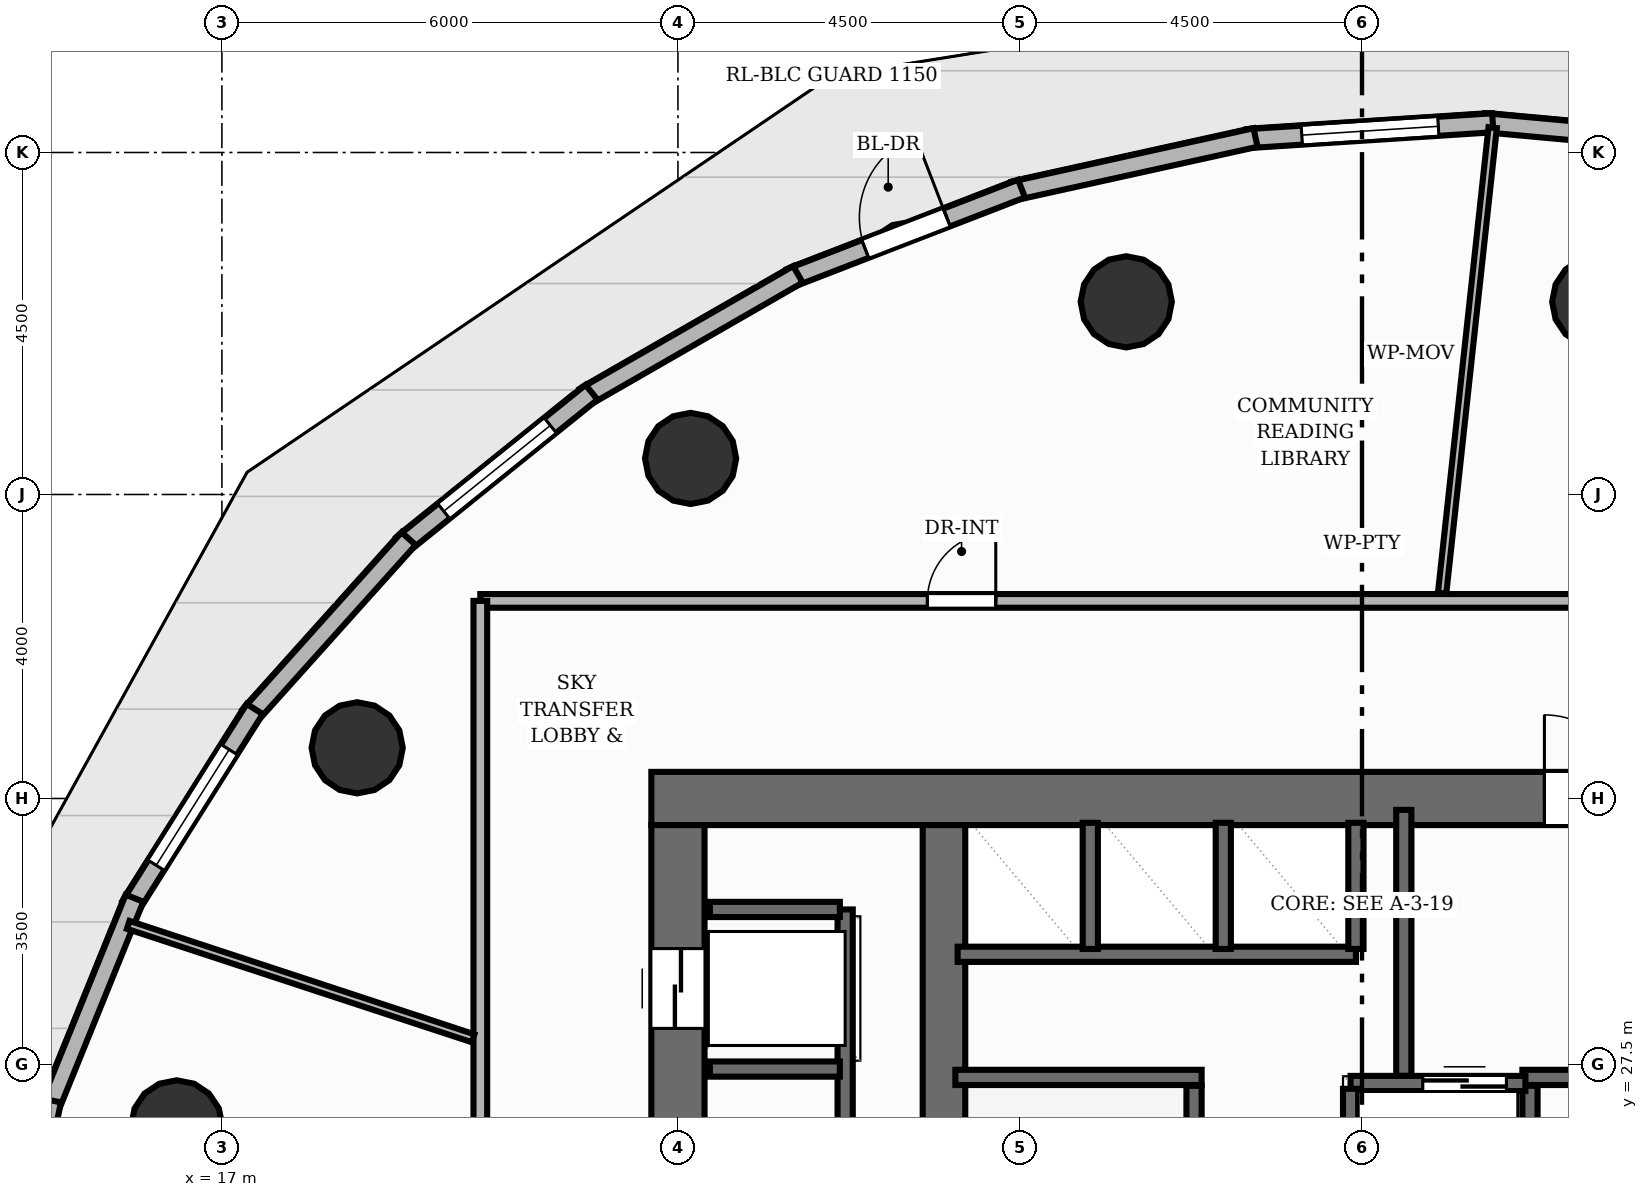
"""IFC4 building model, lengths in metres.
Left out: names, types, materials, properties, quantities, classifications, styles, units other than length and angle.
Written with IfcOpenShell. Run it as: python <this file> out.ifc"""

import sys

from ifc_helpers import new_model, si_unit, direction, frame, frame_2d, origin, origin_2d, place, context, subcontext, project, spatial, rectangle, circle, extrude, element, fill, save


model = new_model("IFC4")
c1 = context("Model", 3, precision=1e-05, world=origin(), true_north=direction((0.0, 1.0)))
c2 = subcontext(c1, "Body", "Model", "MODEL_VIEW")
j1 = project(units=[si_unit("LENGTHUNIT", "METRE"), si_unit("PLANEANGLEUNIT", "RADIAN")], contexts=[c1])
p1 = place(None, origin())
s1 = spatial("IfcSite", under=j1, at=p1, CompositionType="ELEMENT")
p2 = place(p1, origin())
s2 = spatial("IfcBuilding", under=s1, at=p2, CompositionType="ELEMENT")
p3 = place(p2, frame((0.0, 0.0, 70.88)))
s3 = spatial("IfcBuildingStorey", under=s2, at=p3, CompositionType="ELEMENT", Elevation=70.88)
p4 = place(p3, frame((22.65, 31.0, 0.0), z_axis=(0.0, 0.0, 1.0), x_axis=(1.0, 0.0, 0.0)))
e1 = element("IfcWall", 1, at=p4, inside=s3, PredefinedType="SHEAR", context=c2, shape_type="SweptSolid", body=[
    extrude(rectangle(XDim=18.7, YDim=0.7, at=frame_2d((9.35, 0.0))), origin(), (0.0, 0.0, 1.0), 3.2),
])
p5 = place(p4, frame((11.75, 0.0, 0.0)))
e2 = element("IfcOpeningElement", 2, at=p5, cuts=e1, PredefinedType="OPENING", context=c2, shape_type="SweptSolid", body=[
    extrude(rectangle(XDim=1.1, YDim=2.15, at=frame_2d((0.55, 1.075))), frame((0.0, 0.36, 0.0), z_axis=(0.0, -1.0, 0.0), x_axis=(1.0, 0.0, 0.0)), (0.0, 0.0, 1.0), 0.72),
])
p6 = place(p3, frame((23.0, 17.35, 0.0), z_axis=(0.0, 0.0, 1.0), x_axis=(0.0, 1.0, 0.0)))
e3 = element("IfcWall", 3, at=p6, inside=s3, PredefinedType="SHEAR", context=c2, shape_type="SweptSolid", body=[
    extrude(rectangle(XDim=13.3, YDim=0.7, at=frame_2d((6.65, 0.0))), origin(), (0.0, 0.0, 1.0), 3.2),
])
p7 = place(p6, frame((1.625, 0.0, 0.0)))
e4 = element("IfcOpeningElement", 4, at=p7, cuts=e3, PredefinedType="OPENING", context=c2, shape_type="SweptSolid", body=[
    extrude(rectangle(XDim=1.05, YDim=2.15, at=frame_2d((0.525, 1.075))), frame((0.0, 0.36, 0.0), z_axis=(0.0, -1.0, 0.0), x_axis=(1.0, 0.0, 0.0)), (0.0, 0.0, 1.0), 0.72),
])
p8 = place(p6, frame((6.125, 0.0, 0.0)))
e5 = element("IfcOpeningElement", 5, at=p8, cuts=e3, PredefinedType="OPENING", context=c2, shape_type="SweptSolid", body=[
    extrude(rectangle(XDim=1.05, YDim=2.15, at=frame_2d((0.525, 1.075))), frame((0.0, 0.36, 0.0), z_axis=(0.0, -1.0, 0.0), x_axis=(1.0, 0.0, 0.0)), (0.0, 0.0, 1.0), 0.72),
])
p9 = place(p6, frame((10.625, 0.0, 0.0)))
e6 = element("IfcOpeningElement", 6, at=p9, cuts=e3, PredefinedType="OPENING", context=c2, shape_type="SweptSolid", body=[
    extrude(rectangle(XDim=1.05, YDim=2.15, at=frame_2d((0.525, 1.075))), frame((0.0, 0.36, 0.0), z_axis=(0.0, -1.0, 0.0), x_axis=(1.0, 0.0, 0.0)), (0.0, 0.0, 1.0), 0.72),
])
p10 = place(p3, frame((26.5, 17.35, 0.0), z_axis=(0.0, 0.0, 1.0), x_axis=(0.0, 1.0, 0.0)))
e7 = element("IfcWall", 7, at=p10, inside=s3, PredefinedType="SHEAR", context=c2, shape_type="SweptSolid", body=[
    extrude(rectangle(XDim=13.3, YDim=0.56, at=frame_2d((6.65, 0.0))), origin(), (0.0, 0.0, 1.0), 3.2),
])
for number, where, z_axis, x_axis in (
    (8, (35.102, 37.535, 0.0), (0.0, 0.0, 1.0), (1.0, 0.0, 0.0)),
    (9, (28.898, 37.535, 0.0), (0.0, 0.0, 1.0), (1.0, 0.0, 0.0)),
    (10, (23.167, 35.474, 0.0), (0.0, 0.0, 1.0), (1.0, 0.0, 0.0)),
    (11, (18.78, 31.667, 0.0), (0.0, 0.0, 1.0), (1.0, 0.0, 0.0)),
    (12, (16.406, 26.692, 0.0), (0.0, 0.0, 1.0), (1.0, 0.0, 0.0)),
):
    element("IfcColumn", number, at=place(p3, frame(where, z_axis=z_axis, x_axis=x_axis)), inside=s3, PredefinedType="COLUMN", context=c2, shape_type="SweptSolid", body=[
        extrude(circle(Radius=0.6, at=origin_2d()), origin(), (0.0, 0.0, 1.0), 3.2),
    ])
p11 = place(p3, frame((33.612, 39.892, 0.0), z_axis=(0.0, 0.0, 1.0), x_axis=(0.9958277433, -0.091252976247, 0.0)))
e13 = element("IfcWall", 13, at=p11, inside=s3, PredefinedType="SOLIDWALL", context=c2, shape_type="SweptSolid", body=[
    extrude(rectangle(XDim=3.192, YDim=0.25, at=frame_2d((1.596, 0.0))), origin(), (0.0, 0.0, 1.0), 2.96),
])
p12 = place(p3, frame((30.491, 39.682, 0.0), z_axis=(0.0, 0.0, 1.0), x_axis=(0.997907602465, 0.064656143896, 0.0)))
e14 = element("IfcWall", 14, at=p12, inside=s3, PredefinedType="SOLIDWALL", context=c2, shape_type="SweptSolid", body=[
    extrude(rectangle(XDim=3.236, YDim=0.25, at=frame_2d((1.618, 0.0))), origin(), (0.0, 0.0, 1.0), 2.96),
])
p13 = place(p12, frame((0.718, 0.0, 0.85)))
e15 = element("IfcOpeningElement", 15, at=p13, cuts=e14, PredefinedType="OPENING", context=c2, shape_type="SweptSolid", body=[
    extrude(rectangle(XDim=1.8, YDim=2.0, at=frame_2d((0.9, 1.0))), frame((0.0, 0.135, 0.0), z_axis=(0.0, -1.0, 0.0), x_axis=(1.0, 0.0, 0.0)), (0.0, 0.0, 1.0), 0.27),
])
p14 = place(p3, frame((27.416, 38.994, 0.0), z_axis=(0.0, 0.0, 1.0), x_axis=(0.976457694784, 0.215708994476, 0.0)))
e16 = element("IfcWall", 16, at=p14, inside=s3, PredefinedType="SOLIDWALL", context=c2, shape_type="SweptSolid", body=[
    extrude(rectangle(XDim=3.26, YDim=0.25, at=frame_2d((1.63, 0.0))), origin(), (0.0, 0.0, 1.0), 2.96),
])
p15 = place(p3, frame((24.48, 37.85, 0.0), z_axis=(0.0, 0.0, 1.0), x_axis=(0.932707116004, 0.360634767812, 0.0)))
e17 = element("IfcWall", 17, at=p15, inside=s3, PredefinedType="SOLIDWALL", context=c2, shape_type="SweptSolid", body=[
    extrude(rectangle(XDim=3.26, YDim=0.25, at=frame_2d((1.63, 0.0))), origin(), (0.0, 0.0, 1.0), 2.96),
])
p16 = place(p15, frame((1.055, 0.0, 0.0)))
e18 = element("IfcOpeningElement", 18, at=p16, cuts=e17, PredefinedType="OPENING", context=c2, shape_type="SweptSolid", body=[
    extrude(rectangle(XDim=1.15, YDim=2.2, at=frame_2d((0.575, 1.1))), frame((0.0, 0.135, 0.0), z_axis=(0.0, -1.0, 0.0), x_axis=(1.0, 0.0, 0.0)), (0.0, 0.0, 1.0), 0.27),
])
p17 = place(p3, frame((21.773, 36.283, 0.0), z_axis=(0.0, 0.0, 1.0), x_axis=(0.866935640597, 0.498420098975, 0.0)))
e19 = element("IfcWall", 19, at=p17, inside=s3, PredefinedType="SOLIDWALL", context=c2, shape_type="SweptSolid", body=[
    extrude(rectangle(XDim=3.236, YDim=0.25, at=frame_2d((1.618, 0.0))), origin(), (0.0, 0.0, 1.0), 2.96),
])
p18 = place(p3, frame((19.377, 34.344, 0.0), z_axis=(0.0, 0.0, 1.0), x_axis=(0.778932404301, 0.627107893054, 0.0)))
e20 = element("IfcWall", 20, at=p18, inside=s3, PredefinedType="SOLIDWALL", context=c2, shape_type="SweptSolid", body=[
    extrude(rectangle(XDim=3.192, YDim=0.25, at=frame_2d((1.596, 0.0))), origin(), (0.0, 0.0, 1.0), 2.96),
])
p19 = place(p18, frame((0.696, 0.0, 0.85)))
e21 = element("IfcOpeningElement", 21, at=p19, cuts=e20, PredefinedType="OPENING", context=c2, shape_type="SweptSolid", body=[
    extrude(rectangle(XDim=1.8, YDim=2.0, at=frame_2d((0.9, 1.0))), frame((0.0, 0.135, 0.0), z_axis=(0.0, -1.0, 0.0), x_axis=(1.0, 0.0, 0.0)), (0.0, 0.0, 1.0), 0.27),
])
p20 = place(p3, frame((17.365, 32.089, 0.0), z_axis=(0.0, 0.0, 1.0), x_axis=(0.66790863438, 0.744243277511, 0.0)))
e22 = element("IfcWall", 22, at=p20, inside=s3, PredefinedType="SOLIDWALL", context=c2, shape_type="SweptSolid", body=[
    extrude(rectangle(XDim=3.131, YDim=0.25, at=frame_2d((1.565, 0.0))), origin(), (0.0, 0.0, 1.0), 2.96),
])
p21 = place(p3, frame((15.799, 29.588, 0.0), z_axis=(0.0, 0.0, 1.0), x_axis=(0.533407635949, 0.845858317871, 0.0)))
e23 = element("IfcWall", 23, at=p21, inside=s3, PredefinedType="SOLIDWALL", context=c2, shape_type="SweptSolid", body=[
    extrude(rectangle(XDim=3.061, YDim=0.25, at=frame_2d((1.53, 0.0))), origin(), (0.0, 0.0, 1.0), 2.96),
])
p22 = place(p21, frame((0.63, 0.0, 0.85)))
e24 = element("IfcOpeningElement", 24, at=p22, cuts=e23, PredefinedType="OPENING", context=c2, shape_type="SweptSolid", body=[
    extrude(rectangle(XDim=1.8, YDim=2.0, at=frame_2d((0.9, 1.0))), frame((0.0, 0.135, 0.0), z_axis=(0.0, -1.0, 0.0), x_axis=(1.0, 0.0, 0.0)), (0.0, 0.0, 1.0), 0.27),
])
p23 = place(p3, frame((14.727, 26.918, 0.0), z_axis=(0.0, 0.0, 1.0), x_axis=(0.376048320415, 0.926600054345, 0.0)))
e25 = element("IfcWall", 25, at=p23, inside=s3, PredefinedType="SOLIDWALL", context=c2, shape_type="SweptSolid", body=[
    extrude(rectangle(XDim=2.988, YDim=0.25, at=frame_2d((1.494, 0.0))), origin(), (0.0, 0.0, 1.0), 2.96),
])
p24 = place(p3, frame((14.179, 24.161, 0.0), z_axis=(0.0, 0.0, 1.0), x_axis=(0.198331811595, 0.980134935868, 0.0)))
e26 = element("IfcWall", 26, at=p24, inside=s3, PredefinedType="SOLIDWALL", context=c2, shape_type="SweptSolid", body=[
    extrude(rectangle(XDim=2.924, YDim=0.25, at=frame_2d((1.462, 0.0))), origin(), (0.0, 0.0, 1.0), 2.96),
])
p25 = place(p24, frame((0.562, 0.0, 0.85)))
e27 = element("IfcOpeningElement", 27, at=p25, cuts=e26, PredefinedType="OPENING", context=c2, shape_type="SweptSolid", body=[
    extrude(rectangle(XDim=1.8, YDim=2.0, at=frame_2d((0.9, 1.0))), frame((0.0, 0.135, 0.0), z_axis=(0.0, -1.0, 0.0), x_axis=(1.0, 0.0, 0.0)), (0.0, 0.0, 1.0), 0.27),
])
p26 = place(p3, frame((29.79, 20.78, 0.0), z_axis=(0.0, 0.0, 1.0), x_axis=(0.0, 1.0, 0.0)))
e28 = element("IfcWall", 28, at=p26, inside=s3, PredefinedType="SHEAR", context=c2, shape_type="SweptSolid", body=[
    extrude(rectangle(XDim=6.44, YDim=0.2, at=frame_2d((3.22, 0.0))), origin(), (0.0, 0.0, 1.0), 3.2),
])
p27 = place(p3, frame((26.65, 27.33, 0.0), z_axis=(0.0, 0.0, 1.0), x_axis=(1.0, 0.0, 0.0)))
e29 = element("IfcWall", 29, at=p27, inside=s3, PredefinedType="SHEAR", context=c2, shape_type="SweptSolid", body=[
    extrude(rectangle(XDim=3.24, YDim=0.2, at=frame_2d((1.62, 0.0))), origin(), (0.0, 0.0, 1.0), 3.2),
])
p28 = place(p3, frame((34.21, 20.78, 0.0), z_axis=(0.0, 0.0, 1.0), x_axis=(0.0, 1.0, 0.0)))
e30 = element("IfcWall", 30, at=p28, inside=s3, PredefinedType="SHEAR", context=c2, shape_type="SweptSolid", body=[
    extrude(rectangle(XDim=6.44, YDim=0.2, at=frame_2d((3.22, 0.0))), origin(), (0.0, 0.0, 1.0), 3.2),
])
p29 = place(p3, frame((34.11, 27.33, 0.0), z_axis=(0.0, 0.0, 1.0), x_axis=(1.0, 0.0, 0.0)))
e31 = element("IfcWall", 31, at=p29, inside=s3, PredefinedType="SHEAR", context=c2, shape_type="SweptSolid", body=[
    extrude(rectangle(XDim=3.24, YDim=0.2, at=frame_2d((1.62, 0.0))), origin(), (0.0, 0.0, 1.0), 3.2),
])
p30 = place(p29, frame((1.135, 0.0, 0.0)))
e32 = element("IfcOpeningElement", 32, at=p30, cuts=e31, PredefinedType="OPENING", context=c2, shape_type="SweptSolid", body=[
    extrude(rectangle(XDim=1.05, YDim=2.15, at=frame_2d((0.525, 1.075))), frame((0.0, 0.11, 0.0), z_axis=(0.0, -1.0, 0.0), x_axis=(1.0, 0.0, 0.0)), (0.0, 0.0, 1.0), 0.22),
])
p31 = place(p3, frame((32.55, 27.35, 0.0), z_axis=(0.0, 0.0, 1.0), x_axis=(0.0, 1.0, 0.0)))
e33 = element("IfcWall", 33, at=p31, inside=s3, PredefinedType="SHEAR", context=c2, shape_type="SweptSolid", body=[
    extrude(rectangle(XDim=3.5, YDim=0.2, at=frame_2d((1.75, 0.0))), origin(), (0.0, 0.0, 1.0), 3.2),
])
p32 = place(p3, frame((31.85, 27.25, 0.0), z_axis=(0.0, 0.0, 1.0), x_axis=(1.0, 0.0, 0.0)))
e34 = element("IfcWall", 34, at=p32, inside=s3, PredefinedType="SHEAR", context=c2, shape_type="SweptSolid", body=[
    extrude(rectangle(XDim=2.3, YDim=0.2, at=frame_2d((1.15, 0.0))), origin(), (0.0, 0.0, 1.0), 3.2),
])
p33 = place(p32, frame((0.95, 0.0, 0.0)))
e35 = element("IfcOpeningElement", 35, at=p33, cuts=e34, PredefinedType="OPENING", context=c2, shape_type="SweptSolid", body=[
    extrude(rectangle(XDim=1.1, YDim=2.15, at=frame_2d((0.55, 1.075))), frame((0.0, 0.11, 0.0), z_axis=(0.0, -1.0, 0.0), x_axis=(1.0, 0.0, 0.0)), (0.0, 0.0, 1.0), 0.22),
])
p34 = place(p3, frame((31.85, 25.47, 0.0), z_axis=(0.0, 0.0, 1.0), x_axis=(0.0, 1.0, 0.0)))
e36 = element("IfcWall", 36, at=p34, inside=s3, PredefinedType="SHEAR", context=c2, shape_type="SweptSolid", body=[
    extrude(rectangle(XDim=1.71, YDim=0.2, at=frame_2d((0.855, 0.0))), origin(), (0.0, 0.0, 1.0), 3.2),
])
p35 = place(p3, frame((25.2, 18.46, 0.0), z_axis=(0.0, 0.0, 1.0), x_axis=(0.0, 1.0, 0.0)))
e37 = element("IfcWall", 37, at=p35, inside=s3, PredefinedType="SHEAR", context=c2, shape_type="SweptSolid", body=[
    extrude(rectangle(XDim=11.08, YDim=0.2, at=frame_2d((5.54, 0.0))), origin(), (0.0, 0.0, 1.0), 3.2),
])
for number, where, z_axis, x_axis in (
    (38, (23.42, 29.54, 0.0), (0.0, 0.0, 1.0), (1.0, 0.0, 0.0)),
    (39, (23.42, 27.44, 0.0), (0.0, 0.0, 1.0), (1.0, 0.0, 0.0)),
):
    element("IfcWall", number, at=place(p3, frame(where, z_axis=z_axis, x_axis=x_axis)), inside=s3, PredefinedType="SHEAR", context=c2, shape_type="SweptSolid", body=[
        extrude(rectangle(XDim=1.71, YDim=0.2, at=frame_2d((0.855, 0.0))), origin(), (0.0, 0.0, 1.0), 3.2),
    ])
p36 = place(p3, frame((26.68, 28.95, 0.0), z_axis=(0.0, 0.0, 1.0), x_axis=(1.0, 0.0, 0.0)))
e40 = element("IfcWall", 40, at=p36, inside=s3, PredefinedType="SHEAR", context=c2, shape_type="SweptSolid", body=[
    extrude(rectangle(XDim=5.24, YDim=0.2, at=frame_2d((2.62, 0.0))), origin(), (0.0, 0.0, 1.0), 3.2),
])
for number, where, z_axis, x_axis in (
    (41, (31.92, 29.02, 0.0), (0.0, 0.0, 1.0), (0.0, 1.0, 0.0)),
    (42, (28.425, 29.02, 0.0), (0.0, 0.0, 1.0), (0.0, 1.0, 0.0)),
    (43, (30.175, 29.02, 0.0), (0.0, 0.0, 1.0), (0.0, 1.0, 0.0)),
):
    element("IfcWall", number, at=place(p3, frame(where, z_axis=z_axis, x_axis=x_axis)), inside=s3, PredefinedType="SHEAR", context=c2, shape_type="SweptSolid", body=[
        extrude(rectangle(XDim=1.66, YDim=0.2, at=frame_2d((0.83, 0.0))), origin(), (0.0, 0.0, 1.0), 3.2),
    ])
p37 = place(p3, frame((20.4, 33.6, 0.0), z_axis=(0.0, 0.0, 1.0), x_axis=(1.0, 0.0, 0.0)))
e44 = element("IfcWall", 44, at=p37, inside=s3, PredefinedType="PARTITIONING", context=c2, shape_type="SweptSolid", body=[
    extrude(rectangle(XDim=23.2, YDim=0.18, at=frame_2d((11.6, 0.0))), origin(), (0.0, 0.0, 1.0), 2.955),
])
p38 = place(p37, frame((17.461, 0.0, 0.0)))
e45 = element("IfcOpeningElement", 45, at=p38, cuts=e44, PredefinedType="OPENING", context=c2, shape_type="SweptSolid", body=[
    extrude(rectangle(XDim=0.9, YDim=2.1, at=frame_2d((0.45, 1.05))), frame((0.0, 0.1, 0.0), z_axis=(0.0, -1.0, 0.0), x_axis=(1.0, 0.0, 0.0)), (0.0, 0.0, 1.0), 0.2),
])
p39 = place(p37, frame((5.882, 0.0, 0.0)))
e46 = element("IfcOpeningElement", 46, at=p39, cuts=e44, PredefinedType="OPENING", context=c2, shape_type="SweptSolid", body=[
    extrude(rectangle(XDim=0.9, YDim=2.1, at=frame_2d((0.45, 1.05))), frame((0.0, 0.1, 0.0), z_axis=(0.0, -1.0, 0.0), x_axis=(1.0, 0.0, 0.0)), (0.0, 0.0, 1.0), 0.2),
])
p40 = place(p3, frame((20.4, 14.4, 0.0), z_axis=(0.0, 0.0, 1.0), x_axis=(0.0, 1.0, 0.0)))
e47 = element("IfcWall", 47, at=p40, inside=s3, PredefinedType="PARTITIONING", context=c2, shape_type="SweptSolid", body=[
    extrude(rectangle(XDim=19.2, YDim=0.18, at=frame_2d((9.6, 0.0))), origin(), (0.0, 0.0, 1.0), 2.955),
])
p41 = place(p40, frame((6.268, 0.0, 0.0)))
e48 = element("IfcOpeningElement", 48, at=p41, cuts=e47, PredefinedType="OPENING", context=c2, shape_type="SweptSolid", body=[
    extrude(rectangle(XDim=0.9, YDim=2.1, at=frame_2d((0.45, 1.05))), frame((0.0, 0.1, 0.0), z_axis=(0.0, -1.0, 0.0), x_axis=(1.0, 0.0, 0.0)), (0.0, 0.0, 1.0), 0.2),
])
p42 = place(p3, frame((33.054, 33.699, 0.0), z_axis=(0.0, 0.0, 1.0), x_axis=(0.108014076948, 0.994149364623, 0.0)))
e49 = element("IfcWall", 49, at=p42, inside=s3, PredefinedType="MOVABLE", context=c2, shape_type="SweptSolid", body=[
    extrude(rectangle(XDim=6.164, YDim=0.11, at=frame_2d((3.082, 0.0))), origin(), (0.0, 0.0, 1.0), 2.955),
])
p43 = place(p3, frame((20.305, 27.845, 0.0), z_axis=(0.0, 0.0, 1.0), x_axis=(-0.949983665887, 0.312299591013, 0.0)))
e50 = element("IfcWall", 50, at=p43, inside=s3, PredefinedType="MOVABLE", context=c2, shape_type="SweptSolid", body=[
    extrude(rectangle(XDim=4.777, YDim=0.11, at=frame_2d((2.388, 0.0))), origin(), (0.0, 0.0, 1.0), 2.955),
])
p44 = place(p16, origin())
e51 = element("IfcDoor", 51, at=p44, inside=s3, OperationType="SINGLE_SWING_RIGHT", PredefinedType="DOOR", context=c2, shape_type="SweptSolid", body=[
    extrude(rectangle(XDim=1.15, YDim=2.2, at=frame_2d((0.575, 1.1))), frame((0.0, 0.025, 0.0), z_axis=(0.0, -1.0, 0.0), x_axis=(1.0, 0.0, 0.0)), (0.0, 0.0, 1.0), 0.05),
])
fill(e18, e51)
p45 = place(p13, origin())
e52 = element("IfcWindow", 52, at=p45, inside=s3, PartitioningType="SINGLE_PANEL", PredefinedType="WINDOW", context=c2, shape_type="SweptSolid", body=[
    extrude(rectangle(XDim=1.8, YDim=2.0, at=frame_2d((0.9, 1.0))), frame((0.0, 0.03, 0.0), z_axis=(0.0, -1.0, 0.0), x_axis=(1.0, 0.0, 0.0)), (0.0, 0.0, 1.0), 0.06),
])
fill(e15, e52)
p46 = place(p19, origin())
e53 = element("IfcWindow", 53, at=p46, inside=s3, PartitioningType="SINGLE_PANEL", PredefinedType="WINDOW", context=c2, shape_type="SweptSolid", body=[
    extrude(rectangle(XDim=1.8, YDim=2.0, at=frame_2d((0.9, 1.0))), frame((0.0, 0.03, 0.0), z_axis=(0.0, -1.0, 0.0), x_axis=(1.0, 0.0, 0.0)), (0.0, 0.0, 1.0), 0.06),
])
fill(e21, e53)
p47 = place(p22, origin())
e54 = element("IfcWindow", 54, at=p47, inside=s3, PartitioningType="SINGLE_PANEL", PredefinedType="WINDOW", context=c2, shape_type="SweptSolid", body=[
    extrude(rectangle(XDim=1.8, YDim=2.0, at=frame_2d((0.9, 1.0))), frame((0.0, 0.03, 0.0), z_axis=(0.0, -1.0, 0.0), x_axis=(1.0, 0.0, 0.0)), (0.0, 0.0, 1.0), 0.06),
])
fill(e24, e54)
p48 = place(p5, origin())
e55 = element("IfcDoor", 55, at=p48, inside=s3, OperationType="SINGLE_SWING_LEFT", PredefinedType="DOOR", context=c2, shape_type="SweptSolid", body=[
    extrude(rectangle(XDim=1.1, YDim=2.15, at=frame_2d((0.55, 1.075))), frame((0.0, 0.025, 0.0), z_axis=(0.0, -1.0, 0.0), x_axis=(1.0, 0.0, 0.0)), (0.0, 0.0, 1.0), 0.05),
])
fill(e2, e55)
p49 = place(p33, origin())
e56 = element("IfcDoor", 56, at=p49, inside=s3, OperationType="DOUBLE_DOOR_SLIDING", PredefinedType="DOOR", context=c2, shape_type="SweptSolid", body=[
    extrude(rectangle(XDim=1.1, YDim=2.15, at=frame_2d((0.55, 1.075))), frame((0.0, 0.025, 0.0), z_axis=(0.0, -1.0, 0.0), x_axis=(1.0, 0.0, 0.0)), (0.0, 0.0, 1.0), 0.05),
])
fill(e35, e56)
p50 = place(p9, origin())
e57 = element("IfcDoor", 57, at=p50, inside=s3, OperationType="DOUBLE_DOOR_SLIDING", PredefinedType="DOOR", context=c2, shape_type="SweptSolid", body=[
    extrude(rectangle(XDim=1.05, YDim=2.15, at=frame_2d((0.525, 1.075))), frame((0.0, 0.025, 0.0), z_axis=(0.0, -1.0, 0.0), x_axis=(1.0, 0.0, 0.0)), (0.0, 0.0, 1.0), 0.05),
])
fill(e6, e57)
p51 = place(p39, origin())
e58 = element("IfcDoor", 58, at=p51, inside=s3, OperationType="SINGLE_SWING_RIGHT", PredefinedType="DOOR", context=c2, shape_type="SweptSolid", body=[
    extrude(rectangle(XDim=0.9, YDim=2.1, at=frame_2d((0.45, 1.05))), frame((0.0, 0.025, 0.0), z_axis=(0.0, -1.0, 0.0), x_axis=(1.0, 0.0, 0.0)), (0.0, 0.0, 1.0), 0.05),
])
fill(e46, e58)
save(model, sys.argv[1])
